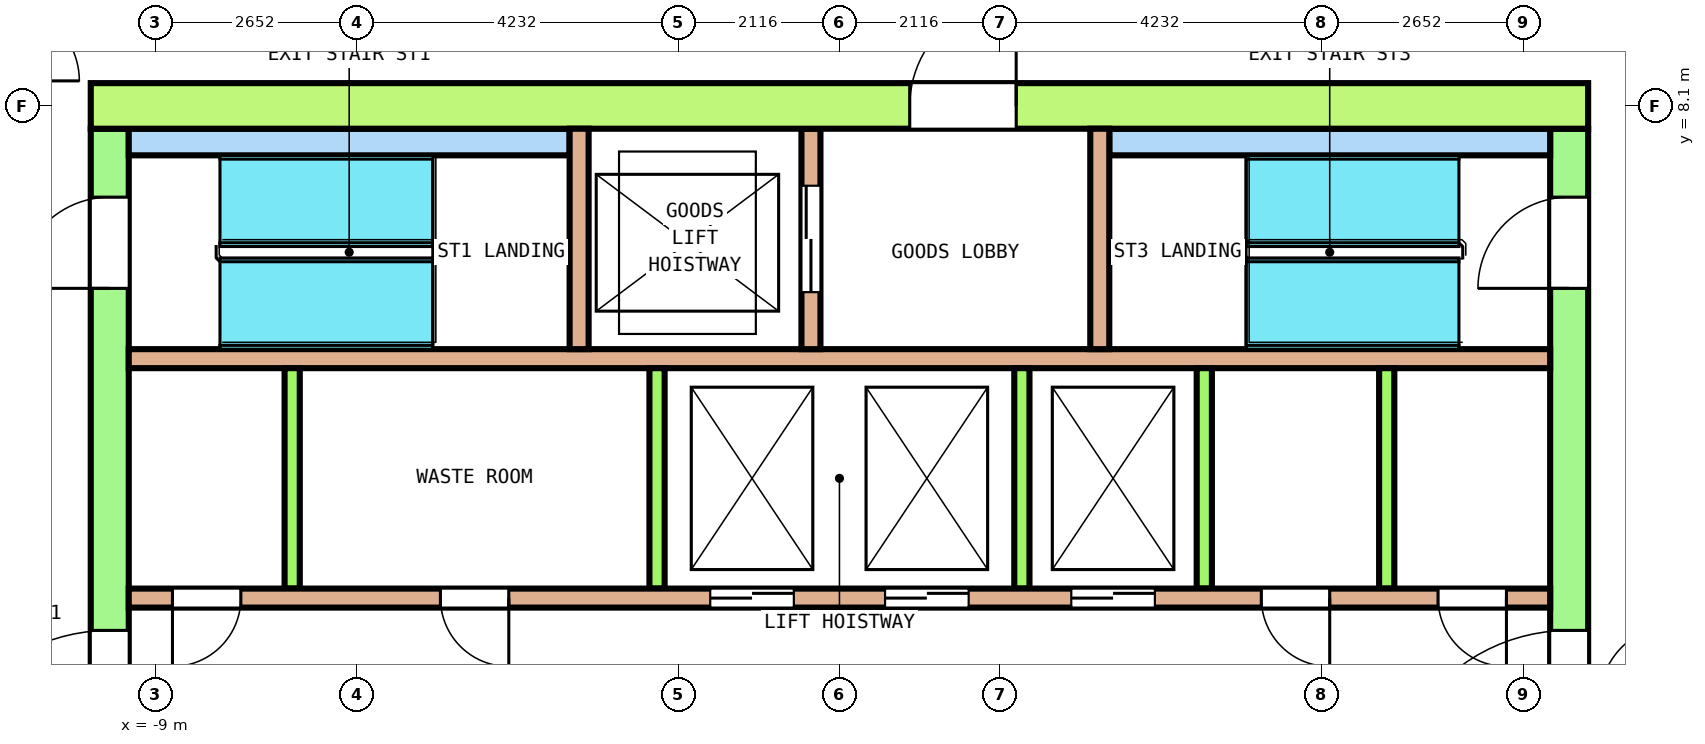
"""IFC4 building model, lengths in metres.
Left out: names, types, materials, properties, quantities, classifications, styles, units other than length and angle.
Written with IfcOpenShell. Run it as: python <this file> out.ifc"""

import sys

from ifc_helpers import new_model, si_unit, direction, frame, frame_2d, origin, place, context, subcontext, project, spatial, rectangle, extrude, element, fill, save


model = new_model("IFC4")
c1 = context("Model", 3, precision=1e-05, world=origin(), true_north=direction((0.0, 1.0)))
c2 = subcontext(c1, "Body", "Model", "MODEL_VIEW")
j1 = project(units=[si_unit("LENGTHUNIT", "METRE"), si_unit("PLANEANGLEUNIT", "RADIAN")], contexts=[c1])
p1 = place(None, origin())
s1 = spatial("IfcSite", under=j1, at=p1, CompositionType="ELEMENT")
p2 = place(p1, origin())
s2 = spatial("IfcBuilding", under=s1, at=p2, CompositionType="ELEMENT")
p3 = place(p2, frame((0.0, 0.0, 249.4)))
s3 = spatial("IfcBuildingStorey", under=s2, at=p3, CompositionType="ELEMENT", Elevation=249.4)
p4 = place(p3, frame((-9.85, 8.1, 0.0), z_axis=(0.0, 0.0, 1.0), x_axis=(1.0, 0.0, 0.0)))
e1 = element("IfcWall", 1, at=p4, inside=s3, PredefinedType="SHEAR", context=c2, shape_type="SweptSolid", body=[
    extrude(rectangle(XDim=19.7, YDim=0.6, at=frame_2d((9.85, 0.0))), origin(), (0.0, 0.0, 1.0), 3.7),
])
p5 = place(p4, frame((10.775, 0.0, 0.0)))
e2 = element("IfcOpeningElement", 2, at=p5, cuts=e1, PredefinedType="OPENING", context=c2, shape_type="SweptSolid", body=[
    extrude(rectangle(XDim=1.4, YDim=2.1, at=frame_2d((0.7, 1.05))), frame((0.0, 0.31, 0.0), z_axis=(0.0, -1.0, 0.0), x_axis=(1.0, 0.0, 0.0)), (0.0, 0.0, 1.0), 0.62),
])
p6 = place(p3, frame((-9.6, -7.8, 0.0), z_axis=(0.0, 0.0, 1.0), x_axis=(0.0, 1.0, 0.0)))
e3 = element("IfcWall", 3, at=p6, inside=s3, PredefinedType="SHEAR", context=c2, shape_type="SweptSolid", body=[
    extrude(rectangle(XDim=15.6, YDim=0.5, at=frame_2d((7.8, 0.0))), origin(), (0.0, 0.0, 1.0), 3.7),
])
p7 = place(p6, frame((6.6, 0.0, 0.0)))
e4 = element("IfcOpeningElement", 4, at=p7, cuts=e3, PredefinedType="OPENING", context=c2, shape_type="SweptSolid", body=[
    extrude(rectangle(XDim=2.4, YDim=2.1, at=frame_2d((1.2, 1.05))), frame((0.0, 0.26, 0.0), z_axis=(0.0, -1.0, 0.0), x_axis=(1.0, 0.0, 0.0)), (0.0, 0.0, 1.0), 0.52),
])
p8 = place(p6, frame((13.5, 0.0, 0.0)))
e5 = element("IfcOpeningElement", 5, at=p8, cuts=e3, PredefinedType="OPENING", context=c2, shape_type="SweptSolid", body=[
    extrude(rectangle(XDim=1.2, YDim=2.1, at=frame_2d((0.6, 1.05))), frame((0.0, 0.26, 0.0), z_axis=(0.0, -1.0, 0.0), x_axis=(1.0, 0.0, 0.0)), (0.0, 0.0, 1.0), 0.52),
])
p9 = place(p6, frame((0.9, 0.0, 0.0)))
e6 = element("IfcOpeningElement", 6, at=p9, cuts=e3, PredefinedType="OPENING", context=c2, shape_type="SweptSolid", body=[
    extrude(rectangle(XDim=1.2, YDim=2.1, at=frame_2d((0.6, 1.05))), frame((0.0, 0.26, 0.0), z_axis=(0.0, -1.0, 0.0), x_axis=(1.0, 0.0, 0.0)), (0.0, 0.0, 1.0), 0.52),
])
p10 = place(p3, frame((9.6, -7.8, 0.0), z_axis=(0.0, 0.0, 1.0), x_axis=(0.0, 1.0, 0.0)))
e7 = element("IfcWall", 7, at=p10, inside=s3, PredefinedType="SHEAR", context=c2, shape_type="SweptSolid", body=[
    extrude(rectangle(XDim=15.6, YDim=0.5, at=frame_2d((7.8, 0.0))), origin(), (0.0, 0.0, 1.0), 3.7),
])
p11 = place(p10, frame((6.6, 0.0, 0.0)))
e8 = element("IfcOpeningElement", 8, at=p11, cuts=e7, PredefinedType="OPENING", context=c2, shape_type="SweptSolid", body=[
    extrude(rectangle(XDim=2.4, YDim=2.1, at=frame_2d((1.2, 1.05))), frame((0.0, 0.26, 0.0), z_axis=(0.0, -1.0, 0.0), x_axis=(1.0, 0.0, 0.0)), (0.0, 0.0, 1.0), 0.52),
])
p12 = place(p10, frame((13.5, 0.0, 0.0)))
e9 = element("IfcOpeningElement", 9, at=p12, cuts=e7, PredefinedType="OPENING", context=c2, shape_type="SweptSolid", body=[
    extrude(rectangle(XDim=1.2, YDim=2.1, at=frame_2d((0.6, 1.05))), frame((0.0, 0.26, 0.0), z_axis=(0.0, -1.0, 0.0), x_axis=(1.0, 0.0, 0.0)), (0.0, 0.0, 1.0), 0.52),
])
p13 = place(p10, frame((1.0, 0.0, 0.0)))
e10 = element("IfcOpeningElement", 10, at=p13, cuts=e7, PredefinedType="OPENING", context=c2, shape_type="SweptSolid", body=[
    extrude(rectangle(XDim=1.0, YDim=2.1, at=frame_2d((0.5, 1.05))), frame((0.0, 0.26, 0.0), z_axis=(0.0, -1.0, 0.0), x_axis=(1.0, 0.0, 0.0)), (0.0, 0.0, 1.0), 0.52),
])
p14 = place(p3, frame((-9.35, 1.625, 0.0), z_axis=(0.0, 0.0, 1.0), x_axis=(1.0, 0.0, 0.0)))
e11 = element("IfcWall", 11, at=p14, inside=s3, PredefinedType="SOLIDWALL", context=c2, shape_type="SweptSolid", body=[
    extrude(rectangle(XDim=18.7, YDim=0.25, at=frame_2d((9.35, 0.0))), origin(), (0.0, 0.0, 1.0), 3.7),
])
p15 = place(p14, frame((7.65, 0.0, 0.0)))
e12 = element("IfcOpeningElement", 12, at=p15, cuts=e11, PredefinedType="OPENING", context=c2, shape_type="SweptSolid", body=[
    extrude(rectangle(XDim=1.1, YDim=2.1, at=frame_2d((0.55, 1.05))), frame((0.0, 0.135, 0.0), z_axis=(0.0, -1.0, 0.0), x_axis=(1.0, 0.0, 0.0)), (0.0, 0.0, 1.0), 0.27),
])
p16 = place(p14, frame((9.95, 0.0, 0.0)))
e13 = element("IfcOpeningElement", 13, at=p16, cuts=e11, PredefinedType="OPENING", context=c2, shape_type="SweptSolid", body=[
    extrude(rectangle(XDim=1.1, YDim=2.1, at=frame_2d((0.55, 1.05))), frame((0.0, 0.135, 0.0), z_axis=(0.0, -1.0, 0.0), x_axis=(1.0, 0.0, 0.0)), (0.0, 0.0, 1.0), 0.27),
])
p17 = place(p14, frame((12.4, 0.0, 0.0)))
e14 = element("IfcOpeningElement", 14, at=p17, cuts=e11, PredefinedType="OPENING", context=c2, shape_type="SweptSolid", body=[
    extrude(rectangle(XDim=1.1, YDim=2.1, at=frame_2d((0.55, 1.05))), frame((0.0, 0.135, 0.0), z_axis=(0.0, -1.0, 0.0), x_axis=(1.0, 0.0, 0.0)), (0.0, 0.0, 1.0), 0.27),
])
p18 = place(p14, frame((0.575, 0.0, 0.0)))
e15 = element("IfcOpeningElement", 15, at=p18, cuts=e11, PredefinedType="OPENING", context=c2, shape_type="SweptSolid", body=[
    extrude(rectangle(XDim=0.9, YDim=2.1, at=frame_2d((0.45, 1.05))), frame((0.0, 0.135, 0.0), z_axis=(0.0, -1.0, 0.0), x_axis=(1.0, 0.0, 0.0)), (0.0, 0.0, 1.0), 0.27),
])
p19 = place(p14, frame((4.1, 0.0, 0.0)))
e16 = element("IfcOpeningElement", 16, at=p19, cuts=e11, PredefinedType="OPENING", context=c2, shape_type="SweptSolid", body=[
    extrude(rectangle(XDim=0.9, YDim=2.1, at=frame_2d((0.45, 1.05))), frame((0.0, 0.135, 0.0), z_axis=(0.0, -1.0, 0.0), x_axis=(1.0, 0.0, 0.0)), (0.0, 0.0, 1.0), 0.27),
])
p20 = place(p14, frame((14.9, 0.0, 0.0)))
e17 = element("IfcOpeningElement", 17, at=p20, cuts=e11, PredefinedType="OPENING", context=c2, shape_type="SweptSolid", body=[
    extrude(rectangle(XDim=0.9, YDim=2.1, at=frame_2d((0.45, 1.05))), frame((0.0, 0.135, 0.0), z_axis=(0.0, -1.0, 0.0), x_axis=(1.0, 0.0, 0.0)), (0.0, 0.0, 1.0), 0.27),
])
p21 = place(p14, frame((17.225, 0.0, 0.0)))
e18 = element("IfcOpeningElement", 18, at=p21, cuts=e11, PredefinedType="OPENING", context=c2, shape_type="SweptSolid", body=[
    extrude(rectangle(XDim=0.9, YDim=2.1, at=frame_2d((0.45, 1.05))), frame((0.0, 0.135, 0.0), z_axis=(0.0, -1.0, 0.0), x_axis=(1.0, 0.0, 0.0)), (0.0, 0.0, 1.0), 0.27),
])
p22 = place(p3, frame((-9.35, 4.775, 0.0), z_axis=(0.0, 0.0, 1.0), x_axis=(1.0, 0.0, 0.0)))
e19 = element("IfcWall", 19, at=p22, inside=s3, PredefinedType="SOLIDWALL", context=c2, shape_type="SweptSolid", body=[
    extrude(rectangle(XDim=18.7, YDim=0.25, at=frame_2d((9.35, 0.0))), origin(), (0.0, 0.0, 1.0), 3.7),
])
for number, where, z_axis, x_axis in (
    (20, (-7.2, 1.75, 0.0), (0.0, 0.0, 1.0), (0.0, 1.0, 0.0)),
    (21, (-2.4, 1.75, 0.0), (0.0, 0.0, 1.0), (0.0, 1.0, 0.0)),
    (22, (2.4, 1.75, 0.0), (0.0, 0.0, 1.0), (0.0, 1.0, 0.0)),
    (23, (4.8, 1.75, 0.0), (0.0, 0.0, 1.0), (0.0, 1.0, 0.0)),
    (24, (7.2, 1.75, 0.0), (0.0, 0.0, 1.0), (0.0, 1.0, 0.0)),
):
    element("IfcWall", number, at=place(p3, frame(where, z_axis=z_axis, x_axis=x_axis)), inside=s3, PredefinedType="SOLIDWALL", context=c2, shape_type="SweptSolid", body=[
        extrude(rectangle(XDim=2.9, YDim=0.2, at=frame_2d((1.45, 0.0))), origin(), (0.0, 0.0, 1.0), 3.7),
    ])
for number, where, z_axis, x_axis in (
    (25, (-9.35, 7.625, 0.0), (0.0, 0.0, 1.0), (1.0, 0.0, 0.0)),
    (26, (3.55, 7.625, 0.0), (0.0, 0.0, 1.0), (1.0, 0.0, 0.0)),
):
    element("IfcWall", number, at=place(p3, frame(where, z_axis=z_axis, x_axis=x_axis)), inside=s3, PredefinedType="SOLIDWALL", context=c2, shape_type="SweptSolid", body=[
        extrude(rectangle(XDim=5.8, YDim=0.35, at=frame_2d((2.9, 0.0))), origin(), (0.0, 0.0, 1.0), 3.7),
    ])
p23 = place(p3, frame((-3.425, 4.9, 0.0), z_axis=(0.0, 0.0, 1.0), x_axis=(0.0, 1.0, 0.0)))
e27 = element("IfcWall", 27, at=p23, inside=s3, PredefinedType="SOLIDWALL", context=c2, shape_type="SweptSolid", body=[
    extrude(rectangle(XDim=2.9, YDim=0.25, at=frame_2d((1.45, 0.0))), origin(), (0.0, 0.0, 1.0), 3.7),
])
p24 = place(p3, frame((-0.375, 4.9, 0.0), z_axis=(0.0, 0.0, 1.0), x_axis=(0.0, 1.0, 0.0)))
e28 = element("IfcWall", 28, at=p24, inside=s3, PredefinedType="SOLIDWALL", context=c2, shape_type="SweptSolid", body=[
    extrude(rectangle(XDim=2.9, YDim=0.25, at=frame_2d((1.45, 0.0))), origin(), (0.0, 0.0, 1.0), 3.7),
])
p25 = place(p24, frame((0.75, 0.0, 0.0)))
e29 = element("IfcOpeningElement", 29, at=p25, cuts=e28, PredefinedType="OPENING", context=c2, shape_type="SweptSolid", body=[
    extrude(rectangle(XDim=1.4, YDim=2.1, at=frame_2d((0.7, 1.05))), frame((0.0, 0.135, 0.0), z_axis=(0.0, -1.0, 0.0), x_axis=(1.0, 0.0, 0.0)), (0.0, 0.0, 1.0), 0.27),
])
p26 = place(p3, frame((3.425, 4.9, 0.0), z_axis=(0.0, 0.0, 1.0), x_axis=(0.0, 1.0, 0.0)))
e30 = element("IfcWall", 30, at=p26, inside=s3, PredefinedType="SOLIDWALL", context=c2, shape_type="SweptSolid", body=[
    extrude(rectangle(XDim=2.9, YDim=0.25, at=frame_2d((1.45, 0.0))), origin(), (0.0, 0.0, 1.0), 3.7),
])
p27 = place(p15, origin())
e31 = element("IfcDoor", 31, at=p27, inside=s3, OperationType="DOUBLE_DOOR_SLIDING", PredefinedType="DOOR", context=c2, shape_type="SweptSolid", body=[
    extrude(rectangle(XDim=1.1, YDim=2.1, at=frame_2d((0.55, 1.05))), frame((0.0, 0.075, 0.0), z_axis=(0.0, -1.0, 0.0), x_axis=(1.0, 0.0, 0.0)), (0.0, 0.0, 1.0), 0.15),
])
fill(e12, e31)
p28 = place(p16, origin())
e32 = element("IfcDoor", 32, at=p28, inside=s3, OperationType="DOUBLE_DOOR_SLIDING", PredefinedType="DOOR", context=c2, shape_type="SweptSolid", body=[
    extrude(rectangle(XDim=1.1, YDim=2.1, at=frame_2d((0.55, 1.05))), frame((0.0, 0.075, 0.0), z_axis=(0.0, -1.0, 0.0), x_axis=(1.0, 0.0, 0.0)), (0.0, 0.0, 1.0), 0.15),
])
fill(e13, e32)
p29 = place(p17, origin())
e33 = element("IfcDoor", 33, at=p29, inside=s3, OperationType="DOUBLE_DOOR_SLIDING", PredefinedType="DOOR", context=c2, shape_type="SweptSolid", body=[
    extrude(rectangle(XDim=1.1, YDim=2.1, at=frame_2d((0.55, 1.05))), frame((0.0, 0.075, 0.0), z_axis=(0.0, -1.0, 0.0), x_axis=(1.0, 0.0, 0.0)), (0.0, 0.0, 1.0), 0.15),
])
fill(e14, e33)
p30 = place(p25, origin())
e34 = element("IfcDoor", 34, at=p30, inside=s3, OperationType="DOUBLE_DOOR_SLIDING", PredefinedType="DOOR", context=c2, shape_type="SweptSolid", body=[
    extrude(rectangle(XDim=1.4, YDim=2.1, at=frame_2d((0.7, 1.05))), frame((0.0, 0.075, 0.0), z_axis=(0.0, -1.0, 0.0), x_axis=(1.0, 0.0, 0.0)), (0.0, 0.0, 1.0), 0.15),
])
fill(e29, e34)
p31 = place(p7, origin())
e35 = element("IfcDoor", 35, at=p31, inside=s3, OperationType="DOUBLE_DOOR_SINGLE_SWING", PredefinedType="DOOR", context=c2, shape_type="SweptSolid", body=[
    extrude(rectangle(XDim=2.4, YDim=2.1, at=frame_2d((1.2, 1.05))), frame((0.0, 0.2, 0.0), z_axis=(0.0, -1.0, 0.0), x_axis=(1.0, 0.0, 0.0)), (0.0, 0.0, 1.0), 0.4),
])
fill(e4, e35)
p32 = place(p11, origin())
e36 = element("IfcDoor", 36, at=p32, inside=s3, OperationType="DOUBLE_DOOR_SINGLE_SWING", PredefinedType="DOOR", context=c2, shape_type="SweptSolid", body=[
    extrude(rectangle(XDim=2.4, YDim=2.1, at=frame_2d((1.2, 1.05))), frame((0.0, 0.2, 0.0), z_axis=(0.0, -1.0, 0.0), x_axis=(1.0, 0.0, 0.0)), (0.0, 0.0, 1.0), 0.4),
])
fill(e8, e36)
p33 = place(p8, origin())
e37 = element("IfcDoor", 37, at=p33, inside=s3, OperationType="SINGLE_SWING_RIGHT", PredefinedType="DOOR", context=c2, shape_type="SweptSolid", body=[
    extrude(rectangle(XDim=1.2, YDim=2.1, at=frame_2d((0.6, 1.05))), frame((0.0, 0.2, 0.0), z_axis=(0.0, -1.0, 0.0), x_axis=(1.0, 0.0, 0.0)), (0.0, 0.0, 1.0), 0.4),
])
fill(e5, e37)
p34 = place(p12, origin())
e38 = element("IfcDoor", 38, at=p34, inside=s3, OperationType="SINGLE_SWING_RIGHT", PredefinedType="DOOR", context=c2, shape_type="SweptSolid", body=[
    extrude(rectangle(XDim=1.2, YDim=2.1, at=frame_2d((0.6, 1.05))), frame((0.0, 0.2, 0.0), z_axis=(0.0, -1.0, 0.0), x_axis=(1.0, 0.0, 0.0)), (0.0, 0.0, 1.0), 0.4),
])
fill(e9, e38)
p35 = place(p5, origin())
e39 = element("IfcDoor", 39, at=p35, inside=s3, OperationType="DOUBLE_DOOR_SINGLE_SWING", PredefinedType="DOOR", context=c2, shape_type="SweptSolid", body=[
    extrude(rectangle(XDim=1.4, YDim=2.1, at=frame_2d((0.7, 1.05))), frame((0.0, 0.25, 0.0), z_axis=(0.0, -1.0, 0.0), x_axis=(1.0, 0.0, 0.0)), (0.0, 0.0, 1.0), 0.5),
])
fill(e2, e39)
p36 = place(p18, origin())
e40 = element("IfcDoor", 40, at=p36, inside=s3, OperationType="SINGLE_SWING_RIGHT", PredefinedType="DOOR", context=c2, shape_type="SweptSolid", body=[
    extrude(rectangle(XDim=0.9, YDim=2.1, at=frame_2d((0.45, 1.05))), frame((0.0, 0.075, 0.0), z_axis=(0.0, -1.0, 0.0), x_axis=(1.0, 0.0, 0.0)), (0.0, 0.0, 1.0), 0.15),
])
fill(e15, e40)
p37 = place(p19, origin())
e41 = element("IfcDoor", 41, at=p37, inside=s3, OperationType="SINGLE_SWING_LEFT", PredefinedType="DOOR", context=c2, shape_type="SweptSolid", body=[
    extrude(rectangle(XDim=0.9, YDim=2.1, at=frame_2d((0.45, 1.05))), frame((0.0, 0.075, 0.0), z_axis=(0.0, -1.0, 0.0), x_axis=(1.0, 0.0, 0.0)), (0.0, 0.0, 1.0), 0.15),
])
fill(e16, e41)
p38 = place(p20, origin())
e42 = element("IfcDoor", 42, at=p38, inside=s3, OperationType="SINGLE_SWING_RIGHT", PredefinedType="DOOR", context=c2, shape_type="SweptSolid", body=[
    extrude(rectangle(XDim=0.9, YDim=2.1, at=frame_2d((0.45, 1.05))), frame((0.0, 0.075, 0.0), z_axis=(0.0, -1.0, 0.0), x_axis=(1.0, 0.0, 0.0)), (0.0, 0.0, 1.0), 0.15),
])
fill(e17, e42)
p39 = place(p21, origin())
e43 = element("IfcDoor", 43, at=p39, inside=s3, OperationType="SINGLE_SWING_LEFT", PredefinedType="DOOR", context=c2, shape_type="SweptSolid", body=[
    extrude(rectangle(XDim=0.9, YDim=2.1, at=frame_2d((0.45, 1.05))), frame((0.0, 0.075, 0.0), z_axis=(0.0, -1.0, 0.0), x_axis=(1.0, 0.0, 0.0)), (0.0, 0.0, 1.0), 0.15),
])
fill(e18, e43)
save(model, sys.argv[1])
